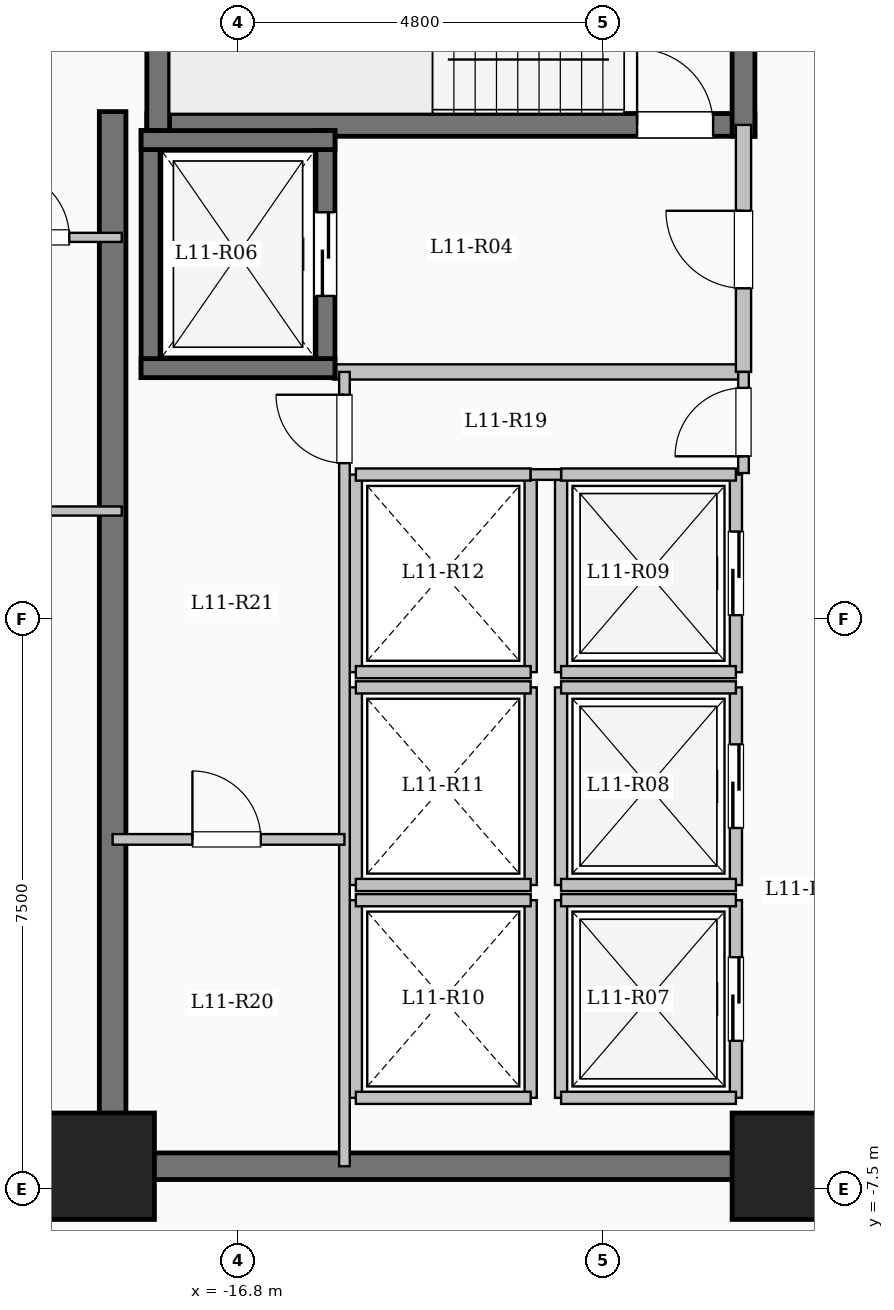
"""IFC4 building model, lengths in metres.
Left out: names, types, materials, properties, quantities, classifications, styles, units other than length and angle.
Written with IfcOpenShell. Run it as: python <this file> out.ifc"""

import sys

from ifc_helpers import new_model, si_unit, direction, frame, frame_2d, origin, origin_2d, place, context, subcontext, project, spatial, rectangle, extrude, element, fill, save


model = new_model("IFC4")
c1 = context("Model", 3, precision=1e-05, world=origin(), true_north=direction((0.0, 1.0)))
c2 = subcontext(c1, "Body", "Model", "MODEL_VIEW")
j1 = project(units=[si_unit("LENGTHUNIT", "METRE"), si_unit("PLANEANGLEUNIT", "RADIAN")], contexts=[c1])
p1 = place(None, origin())
s1 = spatial("IfcSite", under=j1, at=p1, CompositionType="ELEMENT")
p2 = place(p1, origin())
s2 = spatial("IfcBuilding", under=s1, at=p2, CompositionType="ELEMENT")
p3 = place(p2, frame((0.0, 0.0, 44.1)))
s3 = spatial("IfcBuildingStorey", under=s2, at=p3, CompositionType="ELEMENT", Elevation=44.1)
for number, where, z_axis, x_axis in (
    (1, (-9.6, -7.2, 0.0), (0.0, 0.0, 1.0), (1.0, 0.0, 0.0)),
    (2, (-18.6, -7.2, 0.0), (0.0, 0.0, 1.0), (1.0, 0.0, 0.0)),
):
    element("IfcColumn", number, at=place(p3, frame(where, z_axis=z_axis, x_axis=x_axis)), inside=s3, PredefinedType="COLUMN", context=c2, shape_type="SweptSolid", body=[
        extrude(rectangle(XDim=1.4, YDim=1.4, at=origin_2d()), origin(), (0.0, 0.0, 1.0), 3.35),
    ])
p4 = place(p3, frame((-18.0, 6.5, 0.0), z_axis=(0.0, 0.0, 1.0), x_axis=(1.0, 0.0, 0.0)))
e3 = element("IfcWall", 3, at=p4, inside=s3, PredefinedType="SHEAR", context=c2, shape_type="SweptSolid", body=[
    extrude(rectangle(XDim=8.0, YDim=0.3, at=frame_2d((4.0, 0.0))), origin(), (0.0, 0.0, 1.0), 3.35),
])
p5 = place(p4, frame((6.45, 0.0, 0.0)))
e4 = element("IfcOpeningElement", 4, at=p5, cuts=e3, PredefinedType="OPENING", context=c2, shape_type="SweptSolid", body=[
    extrude(rectangle(XDim=1.0, YDim=2.15, at=frame_2d((0.5, 1.075))), frame((0.0, 0.16, 0.0), z_axis=(0.0, -1.0, 0.0), x_axis=(1.0, 0.0, 0.0)), (0.0, 0.0, 1.0), 0.32),
])
for number, where, z_axis, x_axis in (
    (5, (-17.85, 6.35, 0.0), (0.0, 0.0, 1.0), (0.0, 1.0, 0.0)),
    (6, (-10.15, 6.35, 0.0), (0.0, 0.0, 1.0), (0.0, 1.0, 0.0)),
):
    element("IfcWall", number, at=place(p3, frame(where, z_axis=z_axis, x_axis=x_axis)), inside=s3, PredefinedType="SHEAR", context=c2, shape_type="SweptSolid", body=[
        extrude(rectangle(XDim=3.59, YDim=0.3, at=frame_2d((1.795, 0.0))), origin(), (0.0, 0.0, 1.0), 3.35),
    ])
p6 = place(p3, frame((-15.55, 3.25, 0.0), z_axis=(0.0, 0.0, 1.0), x_axis=(1.0, 0.0, 0.0)))
e7 = element("IfcWall", 7, at=p6, inside=s3, PredefinedType="SOLIDWALL", context=c2, shape_type="SweptSolid", body=[
    extrude(rectangle(XDim=5.4, YDim=0.2, at=frame_2d((2.7, 0.0))), origin(), (0.0, 0.0, 1.0), 3.1),
])
p7 = place(p3, frame((-10.15, 3.25, 0.0), z_axis=(0.0, 0.0, 1.0), x_axis=(0.0, 1.0, 0.0)))
e8 = element("IfcWall", 8, at=p7, inside=s3, PredefinedType="SOLIDWALL", context=c2, shape_type="SweptSolid", body=[
    extrude(rectangle(XDim=3.25, YDim=0.2, at=frame_2d((1.625, 0.0))), origin(), (0.0, 0.0, 1.0), 3.1),
])
p8 = place(p7, frame((1.1, 0.0, 0.0)))
e9 = element("IfcOpeningElement", 9, at=p8, cuts=e8, PredefinedType="OPENING", context=c2, shape_type="SweptSolid", body=[
    extrude(rectangle(XDim=1.02, YDim=2.15, at=frame_2d((0.51, 1.075))), frame((0.0, 0.11, 0.0), z_axis=(0.0, -1.0, 0.0), x_axis=(1.0, 0.0, 0.0)), (0.0, 0.0, 1.0), 0.22),
])
p9 = place(p3, frame((-17.95, 3.175, 0.0), z_axis=(0.0, 0.0, 1.0), x_axis=(0.0, 1.0, 0.0)))
e10 = element("IfcWall", 10, at=p9, inside=s3, PredefinedType="SHEAR", context=c2, shape_type="SweptSolid", body=[
    extrude(rectangle(XDim=3.25, YDim=0.25, at=frame_2d((1.625, 0.0))), origin(), (0.0, 0.0, 1.0), 3.35),
])
p10 = place(p3, frame((-15.65, 3.175, 0.0), z_axis=(0.0, 0.0, 1.0), x_axis=(0.0, 1.0, 0.0)))
e11 = element("IfcWall", 11, at=p10, inside=s3, PredefinedType="SHEAR", context=c2, shape_type="SweptSolid", body=[
    extrude(rectangle(XDim=3.25, YDim=0.25, at=frame_2d((1.625, 0.0))), origin(), (0.0, 0.0, 1.0), 3.35),
])
p11 = place(p10, frame((1.075, 0.0, 0.0)))
e12 = element("IfcOpeningElement", 12, at=p11, cuts=e11, PredefinedType="OPENING", context=c2, shape_type="SweptSolid", body=[
    extrude(rectangle(XDim=1.1, YDim=2.15, at=frame_2d((0.55, 1.075))), frame((0.0, 0.135, 0.0), z_axis=(0.0, -1.0, 0.0), x_axis=(1.0, 0.0, 0.0)), (0.0, 0.0, 1.0), 0.27),
])
for number, where, z_axis, x_axis in (
    (13, (-18.075, 3.3, 0.0), (0.0, 0.0, 1.0), (1.0, 0.0, 0.0)),
    (14, (-18.075, 6.3, 0.0), (0.0, 0.0, 1.0), (1.0, 0.0, 0.0)),
):
    element("IfcWall", number, at=place(p3, frame(where, z_axis=z_axis, x_axis=x_axis)), inside=s3, PredefinedType="SHEAR", context=c2, shape_type="SweptSolid", body=[
        extrude(rectangle(XDim=2.55, YDim=0.25, at=frame_2d((1.275, 0.0))), origin(), (0.0, 0.0, 1.0), 3.35),
    ])
p12 = place(p3, frame((-12.55, -6.3, 0.0), z_axis=(0.0, 0.0, 1.0), x_axis=(0.0, 1.0, 0.0)))
e15 = element("IfcWall", 15, at=p12, inside=s3, PredefinedType="SOLIDWALL", context=c2, shape_type="SweptSolid", body=[
    extrude(rectangle(XDim=2.6, YDim=0.16, at=frame_2d((1.3, 0.0))), origin(), (0.0, 0.0, 1.0), 3.1),
])
p13 = place(p3, frame((-10.25, -6.3, 0.0), z_axis=(0.0, 0.0, 1.0), x_axis=(0.0, 1.0, 0.0)))
e16 = element("IfcWall", 16, at=p13, inside=s3, PredefinedType="SOLIDWALL", context=c2, shape_type="SweptSolid", body=[
    extrude(rectangle(XDim=2.6, YDim=0.16, at=frame_2d((1.3, 0.0))), origin(), (0.0, 0.0, 1.0), 3.1),
])
p14 = place(p13, frame((0.75, 0.0, 0.0)))
e17 = element("IfcOpeningElement", 17, at=p14, cuts=e16, PredefinedType="OPENING", context=c2, shape_type="SweptSolid", body=[
    extrude(rectangle(XDim=1.1, YDim=2.15, at=frame_2d((0.55, 1.075))), frame((0.0, 0.09, 0.0), z_axis=(0.0, -1.0, 0.0), x_axis=(1.0, 0.0, 0.0)), (0.0, 0.0, 1.0), 0.18),
])
for number, where, z_axis, x_axis in (
    (18, (-12.55, -6.3, 0.0), (0.0, 0.0, 1.0), (1.0, 0.0, 0.0)),
    (19, (-12.55, -3.7, 0.0), (0.0, 0.0, 1.0), (1.0, 0.0, 0.0)),
):
    element("IfcWall", number, at=place(p3, frame(where, z_axis=z_axis, x_axis=x_axis)), inside=s3, PredefinedType="SOLIDWALL", context=c2, shape_type="SweptSolid", body=[
        extrude(rectangle(XDim=2.3, YDim=0.16, at=frame_2d((1.15, 0.0))), origin(), (0.0, 0.0, 1.0), 3.1),
    ])
p15 = place(p3, frame((-12.55, -3.5, 0.0), z_axis=(0.0, 0.0, 1.0), x_axis=(0.0, 1.0, 0.0)))
e20 = element("IfcWall", 20, at=p15, inside=s3, PredefinedType="SOLIDWALL", context=c2, shape_type="SweptSolid", body=[
    extrude(rectangle(XDim=2.6, YDim=0.16, at=frame_2d((1.3, 0.0))), origin(), (0.0, 0.0, 1.0), 3.1),
])
p16 = place(p3, frame((-10.25, -3.5, 0.0), z_axis=(0.0, 0.0, 1.0), x_axis=(0.0, 1.0, 0.0)))
e21 = element("IfcWall", 21, at=p16, inside=s3, PredefinedType="SOLIDWALL", context=c2, shape_type="SweptSolid", body=[
    extrude(rectangle(XDim=2.6, YDim=0.16, at=frame_2d((1.3, 0.0))), origin(), (0.0, 0.0, 1.0), 3.1),
])
p17 = place(p16, frame((0.75, 0.0, 0.0)))
e22 = element("IfcOpeningElement", 22, at=p17, cuts=e21, PredefinedType="OPENING", context=c2, shape_type="SweptSolid", body=[
    extrude(rectangle(XDim=1.1, YDim=2.15, at=frame_2d((0.55, 1.075))), frame((0.0, 0.09, 0.0), z_axis=(0.0, -1.0, 0.0), x_axis=(1.0, 0.0, 0.0)), (0.0, 0.0, 1.0), 0.18),
])
for number, where, z_axis, x_axis in (
    (23, (-12.55, -3.5, 0.0), (0.0, 0.0, 1.0), (1.0, 0.0, 0.0)),
    (24, (-12.55, -0.9, 0.0), (0.0, 0.0, 1.0), (1.0, 0.0, 0.0)),
):
    element("IfcWall", number, at=place(p3, frame(where, z_axis=z_axis, x_axis=x_axis)), inside=s3, PredefinedType="SOLIDWALL", context=c2, shape_type="SweptSolid", body=[
        extrude(rectangle(XDim=2.3, YDim=0.16, at=frame_2d((1.15, 0.0))), origin(), (0.0, 0.0, 1.0), 3.1),
    ])
p18 = place(p3, frame((-12.55, -0.7, 0.0), z_axis=(0.0, 0.0, 1.0), x_axis=(0.0, 1.0, 0.0)))
e25 = element("IfcWall", 25, at=p18, inside=s3, PredefinedType="SOLIDWALL", context=c2, shape_type="SweptSolid", body=[
    extrude(rectangle(XDim=2.6, YDim=0.16, at=frame_2d((1.3, 0.0))), origin(), (0.0, 0.0, 1.0), 3.1),
])
p19 = place(p3, frame((-10.25, -0.7, 0.0), z_axis=(0.0, 0.0, 1.0), x_axis=(0.0, 1.0, 0.0)))
e26 = element("IfcWall", 26, at=p19, inside=s3, PredefinedType="SOLIDWALL", context=c2, shape_type="SweptSolid", body=[
    extrude(rectangle(XDim=2.6, YDim=0.16, at=frame_2d((1.3, 0.0))), origin(), (0.0, 0.0, 1.0), 3.1),
])
p20 = place(p19, frame((0.75, 0.0, 0.0)))
e27 = element("IfcOpeningElement", 27, at=p20, cuts=e26, PredefinedType="OPENING", context=c2, shape_type="SweptSolid", body=[
    extrude(rectangle(XDim=1.1, YDim=2.15, at=frame_2d((0.55, 1.075))), frame((0.0, 0.09, 0.0), z_axis=(0.0, -1.0, 0.0), x_axis=(1.0, 0.0, 0.0)), (0.0, 0.0, 1.0), 0.18),
])
for number, where, z_axis, x_axis in (
    (28, (-12.55, -0.7, 0.0), (0.0, 0.0, 1.0), (1.0, 0.0, 0.0)),
    (29, (-12.55, 1.9, 0.0), (0.0, 0.0, 1.0), (1.0, 0.0, 0.0)),
):
    element("IfcWall", number, at=place(p3, frame(where, z_axis=z_axis, x_axis=x_axis)), inside=s3, PredefinedType="SOLIDWALL", context=c2, shape_type="SweptSolid", body=[
        extrude(rectangle(XDim=2.3, YDim=0.16, at=frame_2d((1.15, 0.0))), origin(), (0.0, 0.0, 1.0), 3.1),
    ])
for number, where, z_axis, x_axis in (
    (30, (-15.25, -6.3, 0.0), (0.0, 0.0, 1.0), (0.0, 1.0, 0.0)),
    (31, (-12.95, -6.3, 0.0), (0.0, 0.0, 1.0), (0.0, 1.0, 0.0)),
):
    element("IfcWall", number, at=place(p3, frame(where, z_axis=z_axis, x_axis=x_axis)), inside=s3, PredefinedType="SOLIDWALL", context=c2, shape_type="SweptSolid", body=[
        extrude(rectangle(XDim=2.6, YDim=0.16, at=frame_2d((1.3, 0.0))), origin(), (0.0, 0.0, 1.0), 3.1),
    ])
for number, where, z_axis, x_axis in (
    (32, (-15.25, -6.3, 0.0), (0.0, 0.0, 1.0), (1.0, 0.0, 0.0)),
    (33, (-15.25, -3.7, 0.0), (0.0, 0.0, 1.0), (1.0, 0.0, 0.0)),
):
    element("IfcWall", number, at=place(p3, frame(where, z_axis=z_axis, x_axis=x_axis)), inside=s3, PredefinedType="SOLIDWALL", context=c2, shape_type="SweptSolid", body=[
        extrude(rectangle(XDim=2.3, YDim=0.16, at=frame_2d((1.15, 0.0))), origin(), (0.0, 0.0, 1.0), 3.1),
    ])
for number, where, z_axis, x_axis in (
    (34, (-15.25, -3.5, 0.0), (0.0, 0.0, 1.0), (0.0, 1.0, 0.0)),
    (35, (-12.95, -3.5, 0.0), (0.0, 0.0, 1.0), (0.0, 1.0, 0.0)),
):
    element("IfcWall", number, at=place(p3, frame(where, z_axis=z_axis, x_axis=x_axis)), inside=s3, PredefinedType="SOLIDWALL", context=c2, shape_type="SweptSolid", body=[
        extrude(rectangle(XDim=2.6, YDim=0.16, at=frame_2d((1.3, 0.0))), origin(), (0.0, 0.0, 1.0), 3.1),
    ])
for number, where, z_axis, x_axis in (
    (36, (-15.25, -3.5, 0.0), (0.0, 0.0, 1.0), (1.0, 0.0, 0.0)),
    (37, (-15.25, -0.9, 0.0), (0.0, 0.0, 1.0), (1.0, 0.0, 0.0)),
):
    element("IfcWall", number, at=place(p3, frame(where, z_axis=z_axis, x_axis=x_axis)), inside=s3, PredefinedType="SOLIDWALL", context=c2, shape_type="SweptSolid", body=[
        extrude(rectangle(XDim=2.3, YDim=0.16, at=frame_2d((1.15, 0.0))), origin(), (0.0, 0.0, 1.0), 3.1),
    ])
for number, where, z_axis, x_axis in (
    (38, (-15.25, -0.7, 0.0), (0.0, 0.0, 1.0), (0.0, 1.0, 0.0)),
    (39, (-12.95, -0.7, 0.0), (0.0, 0.0, 1.0), (0.0, 1.0, 0.0)),
):
    element("IfcWall", number, at=place(p3, frame(where, z_axis=z_axis, x_axis=x_axis)), inside=s3, PredefinedType="SOLIDWALL", context=c2, shape_type="SweptSolid", body=[
        extrude(rectangle(XDim=2.6, YDim=0.16, at=frame_2d((1.3, 0.0))), origin(), (0.0, 0.0, 1.0), 3.1),
    ])
for number, where, z_axis, x_axis in (
    (40, (-15.25, -0.7, 0.0), (0.0, 0.0, 1.0), (1.0, 0.0, 0.0)),
    (41, (-15.25, 1.9, 0.0), (0.0, 0.0, 1.0), (1.0, 0.0, 0.0)),
):
    element("IfcWall", number, at=place(p3, frame(where, z_axis=z_axis, x_axis=x_axis)), inside=s3, PredefinedType="SOLIDWALL", context=c2, shape_type="SweptSolid", body=[
        extrude(rectangle(XDim=2.3, YDim=0.16, at=frame_2d((1.15, 0.0))), origin(), (0.0, 0.0, 1.0), 3.1),
    ])
p21 = place(p3, frame((-18.45, -7.375, 0.0), z_axis=(0.0, 0.0, 1.0), x_axis=(0.0, 1.0, 0.0)))
e42 = element("IfcWall", 42, at=p21, inside=s3, PredefinedType="SHEAR", context=c2, shape_type="SweptSolid", body=[
    extrude(rectangle(XDim=14.05, YDim=0.35, at=frame_2d((7.025, 0.0))), origin(), (0.0, 0.0, 1.0), 3.35),
])
p22 = place(p3, frame((-18.625, -7.2, 0.0), z_axis=(0.0, 0.0, 1.0), x_axis=(1.0, 0.0, 0.0)))
e43 = element("IfcWall", 43, at=p22, inside=s3, PredefinedType="SHEAR", context=c2, shape_type="SweptSolid", body=[
    extrude(rectangle(XDim=8.55, YDim=0.35, at=frame_2d((4.275, 0.0))), origin(), (0.0, 0.0, 1.0), 3.35),
])
p23 = place(p3, frame((-12.95, 1.9, 0.0), z_axis=(0.0, 0.0, 1.0), x_axis=(1.0, 0.0, 0.0)))
e44 = element("IfcWall", 44, at=p23, inside=s3, PredefinedType="PARTITIONING", context=c2, shape_type="SweptSolid", body=[
    extrude(rectangle(XDim=0.4, YDim=0.14, at=frame_2d((0.2, 0.0))), origin(), (0.0, 0.0, 1.0), 3.1),
])
p24 = place(p3, frame((-10.15, 1.92, 0.0), z_axis=(0.0, 0.0, 1.0), x_axis=(0.0, 1.0, 0.0)))
e45 = element("IfcWall", 45, at=p24, inside=s3, PredefinedType="PARTITIONING", context=c2, shape_type="SweptSolid", body=[
    extrude(rectangle(XDim=1.33, YDim=0.14, at=frame_2d((0.665, 0.0))), origin(), (0.0, 0.0, 1.0), 3.1),
])
p25 = place(p24, frame((0.22, 0.0, 0.0)))
e46 = element("IfcOpeningElement", 46, at=p25, cuts=e45, PredefinedType="OPENING", context=c2, shape_type="SweptSolid", body=[
    extrude(rectangle(XDim=0.9, YDim=2.08, at=frame_2d((0.45, 1.04))), frame((0.0, 0.08, 0.0), z_axis=(0.0, -1.0, 0.0), x_axis=(1.0, 0.0, 0.0)), (0.0, 0.0, 1.0), 0.16),
])
p26 = place(p3, frame((-15.4, -7.2, 0.0), z_axis=(0.0, 0.0, 1.0), x_axis=(0.0, 1.0, 0.0)))
e47 = element("IfcWall", 47, at=p26, inside=s3, PredefinedType="PARTITIONING", context=c2, shape_type="SweptSolid", body=[
    extrude(rectangle(XDim=10.45, YDim=0.14, at=frame_2d((5.225, 0.0))), origin(), (0.0, 0.0, 1.0), 3.1),
])
p27 = place(p26, frame((9.25, 0.0, 0.0)))
e48 = element("IfcOpeningElement", 48, at=p27, cuts=e47, PredefinedType="OPENING", context=c2, shape_type="SweptSolid", body=[
    extrude(rectangle(XDim=0.9, YDim=2.08, at=frame_2d((0.45, 1.04))), frame((0.0, 0.08, 0.0), z_axis=(0.0, -1.0, 0.0), x_axis=(1.0, 0.0, 0.0)), (0.0, 0.0, 1.0), 0.16),
])
p28 = place(p3, frame((-18.45, -2.9, 0.0), z_axis=(0.0, 0.0, 1.0), x_axis=(1.0, 0.0, 0.0)))
e49 = element("IfcWall", 49, at=p28, inside=s3, PredefinedType="PARTITIONING", context=c2, shape_type="SweptSolid", body=[
    extrude(rectangle(XDim=3.05, YDim=0.14, at=frame_2d((1.525, 0.0))), origin(), (0.0, 0.0, 1.0), 3.1),
])
p29 = place(p28, frame((1.05, 0.0, 0.0)))
e50 = element("IfcOpeningElement", 50, at=p29, cuts=e49, PredefinedType="OPENING", context=c2, shape_type="SweptSolid", body=[
    extrude(rectangle(XDim=0.9, YDim=2.08, at=frame_2d((0.45, 1.04))), frame((0.0, 0.08, 0.0), z_axis=(0.0, -1.0, 0.0), x_axis=(1.0, 0.0, 0.0)), (0.0, 0.0, 1.0), 0.16),
])
p30 = place(p3, frame((-28.68, -7.25, 0.0), z_axis=(0.0, 0.0, 1.0), x_axis=(1.0, 0.0, 0.0)))
e51 = element("IfcWall", 51, at=p30, inside=s3, PredefinedType="PARTITIONING", context=c2, shape_type="SweptSolid", body=[
    extrude(rectangle(XDim=10.23, YDim=0.15, at=frame_2d((5.115, 0.0))), origin(), (0.0, 0.0, 1.0), 3.1),
])
p31 = place(p30, frame((7.13, 0.0, 0.0)))
e52 = element("IfcOpeningElement", 52, at=p31, cuts=e51, PredefinedType="OPENING", context=c2, shape_type="SweptSolid", body=[
    extrude(rectangle(XDim=0.96, YDim=2.15, at=frame_2d((0.48, 1.075))), frame((0.0, 0.085, 0.0), z_axis=(0.0, -1.0, 0.0), x_axis=(1.0, 0.0, 0.0)), (0.0, 0.0, 1.0), 0.17),
])
p32 = place(p3, frame((-28.8, 1.42, 0.0), z_axis=(0.0, 0.0, 1.0), x_axis=(1.0, 0.0, 0.0)))
e53 = element("IfcWall", 53, at=p32, inside=s3, PredefinedType="PARTITIONING", context=c2, shape_type="SweptSolid", body=[
    extrude(rectangle(XDim=10.47, YDim=0.12, at=frame_2d((5.235, 0.0))), origin(), (0.0, 0.0, 1.0), 3.1),
])
p33 = place(p32, frame((2.213, 0.0, 0.0)))
e54 = element("IfcOpeningElement", 54, at=p33, cuts=e53, PredefinedType="OPENING", context=c2, shape_type="SweptSolid", body=[
    extrude(rectangle(XDim=0.88, YDim=2.1, at=frame_2d((0.44, 1.05))), frame((0.0, 0.07, 0.0), z_axis=(0.0, -1.0, 0.0), x_axis=(1.0, 0.0, 0.0)), (0.0, 0.0, 1.0), 0.14),
])
p34 = place(p32, frame((7.278, 0.0, 0.0)))
e55 = element("IfcOpeningElement", 55, at=p34, cuts=e53, PredefinedType="OPENING", context=c2, shape_type="SweptSolid", body=[
    extrude(rectangle(XDim=0.88, YDim=2.1, at=frame_2d((0.44, 1.05))), frame((0.0, 0.07, 0.0), z_axis=(0.0, -1.0, 0.0), x_axis=(1.0, 0.0, 0.0)), (0.0, 0.0, 1.0), 0.14),
])
p35 = place(p3, frame((-28.8, 5.02, 0.0), z_axis=(0.0, 0.0, 1.0), x_axis=(1.0, 0.0, 0.0)))
e56 = element("IfcWall", 56, at=p35, inside=s3, PredefinedType="PARTITIONING", context=c2, shape_type="SweptSolid", body=[
    extrude(rectangle(XDim=10.47, YDim=0.12, at=frame_2d((5.235, 0.0))), origin(), (0.0, 0.0, 1.0), 3.1),
])
p36 = place(p35, frame((8.9, 0.0, 0.0)))
e57 = element("IfcOpeningElement", 57, at=p36, cuts=e56, PredefinedType="OPENING", context=c2, shape_type="SweptSolid", body=[
    extrude(rectangle(XDim=0.88, YDim=2.1, at=frame_2d((0.44, 1.05))), frame((0.0, 0.07, 0.0), z_axis=(0.0, -1.0, 0.0), x_axis=(1.0, 0.0, 0.0)), (0.0, 0.0, 1.0), 0.14),
])
p37 = place(p5, origin())
e58 = element("IfcDoor", 58, at=p37, inside=s3, OperationType="SINGLE_SWING_LEFT", PredefinedType="DOOR", context=c2, shape_type="SweptSolid", body=[
    extrude(rectangle(XDim=1.0, YDim=2.15, at=frame_2d((0.5, 1.075))), frame((0.0, 0.025, 0.0), z_axis=(0.0, -1.0, 0.0), x_axis=(1.0, 0.0, 0.0)), (0.0, 0.0, 1.0), 0.05),
])
fill(e4, e58)
p38 = place(p8, origin())
e59 = element("IfcDoor", 59, at=p38, inside=s3, OperationType="SINGLE_SWING_RIGHT", PredefinedType="DOOR", context=c2, shape_type="SweptSolid", body=[
    extrude(rectangle(XDim=1.02, YDim=2.15, at=frame_2d((0.51, 1.075))), frame((0.0, 0.025, 0.0), z_axis=(0.0, -1.0, 0.0), x_axis=(1.0, 0.0, 0.0)), (0.0, 0.0, 1.0), 0.05),
])
fill(e9, e59)
p39 = place(p11, origin())
e60 = element("IfcDoor", 60, at=p39, inside=s3, OperationType="SLIDING_TO_LEFT", PredefinedType="DOOR", context=c2, shape_type="SweptSolid", body=[
    extrude(rectangle(XDim=1.1, YDim=2.15, at=frame_2d((0.55, 1.075))), frame((0.0, 0.025, 0.0), z_axis=(0.0, -1.0, 0.0), x_axis=(1.0, 0.0, 0.0)), (0.0, 0.0, 1.0), 0.05),
])
fill(e12, e60)
p40 = place(p14, origin())
e61 = element("IfcDoor", 61, at=p40, inside=s3, OperationType="SLIDING_TO_LEFT", PredefinedType="DOOR", context=c2, shape_type="SweptSolid", body=[
    extrude(rectangle(XDim=1.1, YDim=2.15, at=frame_2d((0.55, 1.075))), frame((0.0, 0.025, 0.0), z_axis=(0.0, -1.0, 0.0), x_axis=(1.0, 0.0, 0.0)), (0.0, 0.0, 1.0), 0.05),
])
fill(e17, e61)
p41 = place(p17, origin())
e62 = element("IfcDoor", 62, at=p41, inside=s3, OperationType="SLIDING_TO_LEFT", PredefinedType="DOOR", context=c2, shape_type="SweptSolid", body=[
    extrude(rectangle(XDim=1.1, YDim=2.15, at=frame_2d((0.55, 1.075))), frame((0.0, 0.025, 0.0), z_axis=(0.0, -1.0, 0.0), x_axis=(1.0, 0.0, 0.0)), (0.0, 0.0, 1.0), 0.05),
])
fill(e22, e62)
p42 = place(p20, origin())
e63 = element("IfcDoor", 63, at=p42, inside=s3, OperationType="SLIDING_TO_LEFT", PredefinedType="DOOR", context=c2, shape_type="SweptSolid", body=[
    extrude(rectangle(XDim=1.1, YDim=2.15, at=frame_2d((0.55, 1.075))), frame((0.0, 0.025, 0.0), z_axis=(0.0, -1.0, 0.0), x_axis=(1.0, 0.0, 0.0)), (0.0, 0.0, 1.0), 0.05),
])
fill(e27, e63)
p43 = place(p25, origin())
e64 = element("IfcDoor", 64, at=p43, inside=s3, OperationType="SINGLE_SWING_LEFT", PredefinedType="DOOR", context=c2, shape_type="SweptSolid", body=[
    extrude(rectangle(XDim=0.9, YDim=2.08, at=frame_2d((0.45, 1.04))), frame((0.0, 0.025, 0.0), z_axis=(0.0, -1.0, 0.0), x_axis=(1.0, 0.0, 0.0)), (0.0, 0.0, 1.0), 0.05),
])
fill(e46, e64)
p44 = place(p27, origin())
e65 = element("IfcDoor", 65, at=p44, inside=s3, OperationType="SINGLE_SWING_RIGHT", PredefinedType="DOOR", context=c2, shape_type="SweptSolid", body=[
    extrude(rectangle(XDim=0.9, YDim=2.08, at=frame_2d((0.45, 1.04))), frame((0.0, 0.025, 0.0), z_axis=(0.0, -1.0, 0.0), x_axis=(1.0, 0.0, 0.0)), (0.0, 0.0, 1.0), 0.05),
])
fill(e48, e65)
p45 = place(p29, origin())
e66 = element("IfcDoor", 66, at=p45, inside=s3, OperationType="SINGLE_SWING_LEFT", PredefinedType="DOOR", context=c2, shape_type="SweptSolid", body=[
    extrude(rectangle(XDim=0.9, YDim=2.08, at=frame_2d((0.45, 1.04))), frame((0.0, 0.025, 0.0), z_axis=(0.0, -1.0, 0.0), x_axis=(1.0, 0.0, 0.0)), (0.0, 0.0, 1.0), 0.05),
])
fill(e50, e66)
p46 = place(p36, origin())
e67 = element("IfcDoor", 67, at=p46, inside=s3, OperationType="SINGLE_SWING_LEFT", PredefinedType="DOOR", context=c2, shape_type="SweptSolid", body=[
    extrude(rectangle(XDim=0.88, YDim=2.1, at=frame_2d((0.44, 1.05))), frame((0.0, 0.025, 0.0), z_axis=(0.0, -1.0, 0.0), x_axis=(1.0, 0.0, 0.0)), (0.0, 0.0, 1.0), 0.05),
])
fill(e57, e67)
save(model, sys.argv[1])
